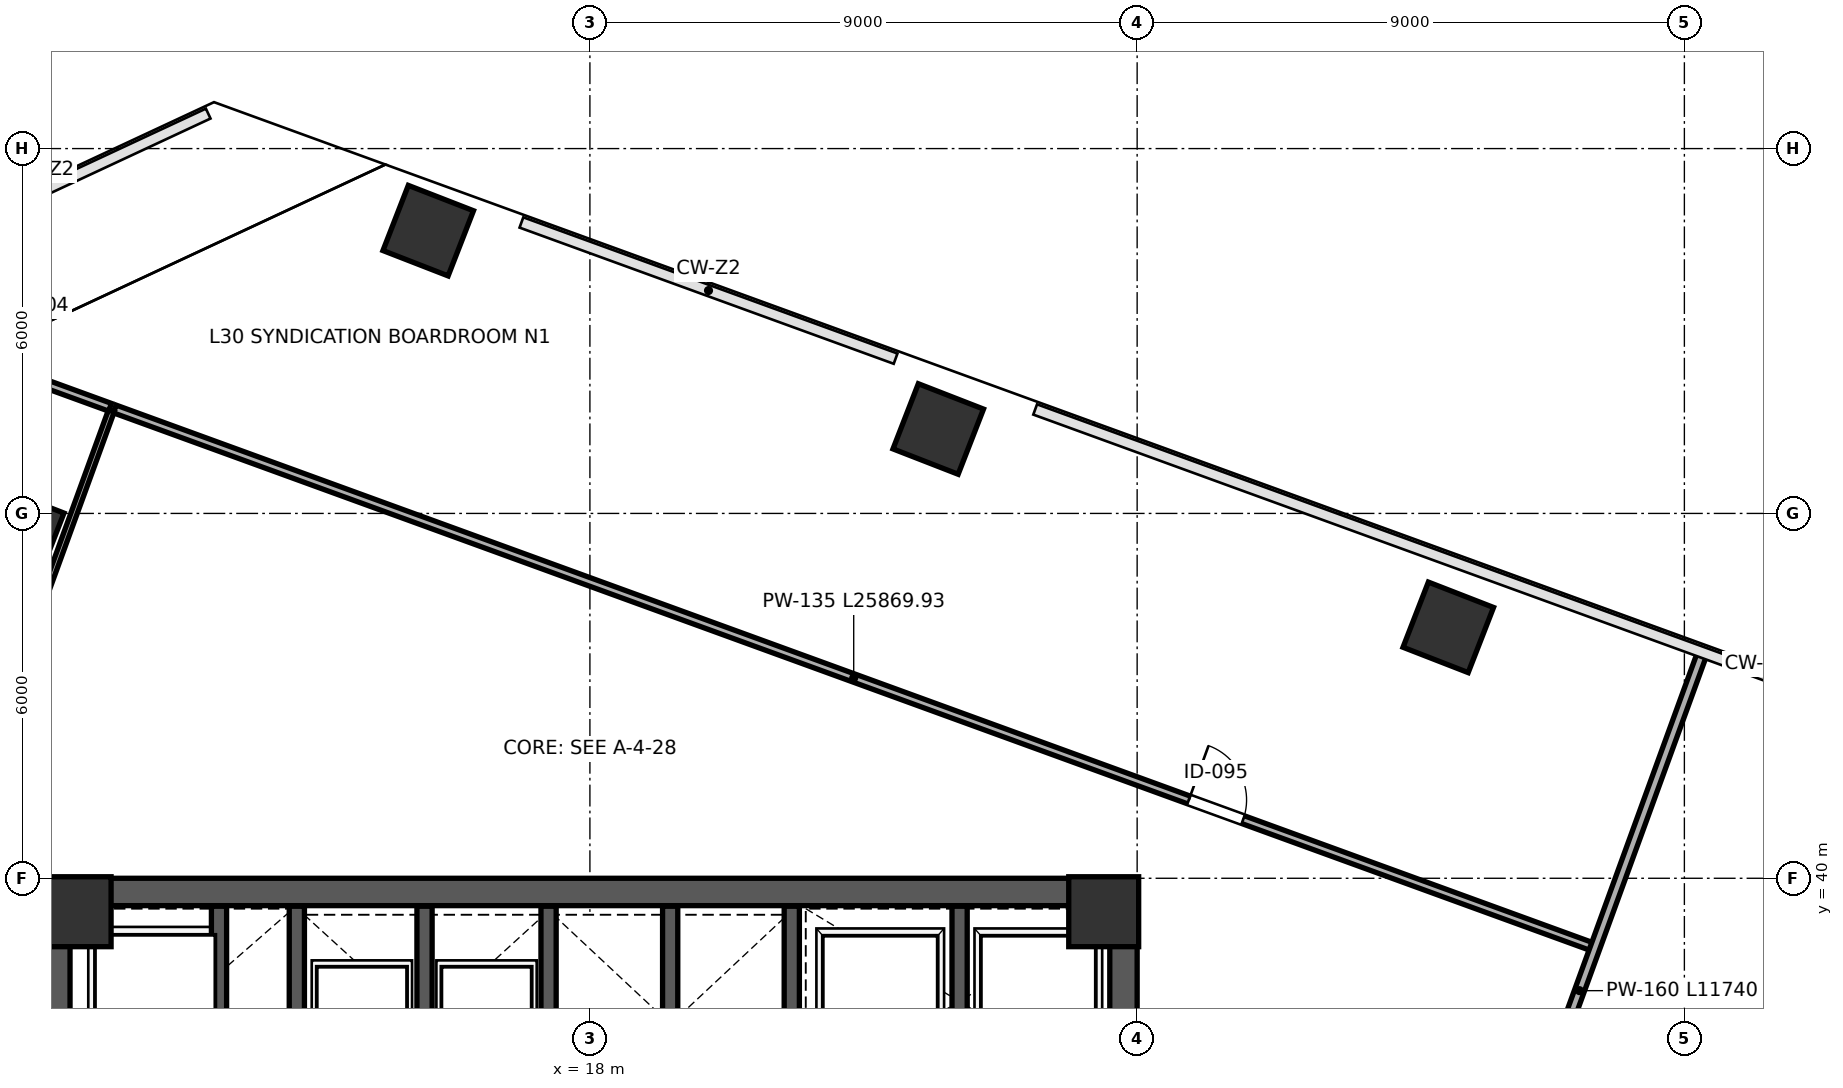
"""IFC4 building model, lengths in metres.
Left out: names, types, materials, properties, quantities, classifications, styles, units other than length and angle.
Written with IfcOpenShell. Run it as: python <this file> out.ifc"""

import sys

from ifc_helpers import new_model, si_unit, direction, frame, frame_2d, origin, origin_2d, place, context, subcontext, project, spatial, rectangle, extrude, clip, halfspace, source, transform, mapped, element, fill, save


model = new_model("IFC4")
c1 = context("Model", 3, precision=1e-05, world=origin(), true_north=direction((0.0, 1.0)))
c2 = subcontext(c1, "Body", "Model", "MODEL_VIEW")
j1 = project(units=[si_unit("LENGTHUNIT", "METRE"), si_unit("PLANEANGLEUNIT", "RADIAN")], contexts=[c1])
p1 = place(None, origin())
s1 = spatial("IfcSite", under=j1, at=p1, CompositionType="ELEMENT")
p2 = place(p1, origin())
s2 = spatial("IfcBuilding", under=s1, at=p2, CompositionType="ELEMENT")
p3 = place(p2, frame((0.0, 0.0, 137.2)))
s3 = spatial("IfcBuildingStorey", under=s2, at=p3, CompositionType="ELEMENT", Elevation=137.2)
m1 = source(origin(), c2, "Body", "SweptSolid", [
    extrude(rectangle(XDim=1.15, YDim=1.15, at=origin_2d()), origin(), (0.0, 0.0, 1.0), 4.198),
])
for number, where, z_axis, x_axis in (
    (1, (9.55, 39.45, 0.001), (0.0, 0.0, 1.0), (1.0, 0.0, 0.0)),
    (2, (26.45, 39.45, 0.001), (0.0, 0.0, 1.0), (1.0, 0.0, 0.0)),
):
    element("IfcColumn", number, at=place(p3, frame(where, z_axis=z_axis, x_axis=x_axis)), inside=s3, PredefinedType="COLUMN", context=c2, shape_type="MappedRepresentation", body=[
        mapped(m1, transform((0.0, 0.0, 0.0), scale=1.0)),
    ])
p4 = place(p3, frame((15.341, 50.65, 0.0), z_axis=(0.096748017345, 0.030765059909, 0.994833318817), x_axis=(-0.061176177051, -0.99744853389, 0.036795347569)))
e3 = element("IfcColumn", 3, at=p4, inside=s3, PredefinedType="COLUMN", context=c2, shape_type="Clipping", body=[
    clip(clip(extrude(rectangle(XDim=1.15, YDim=1.15, at=origin_2d()), origin(), (0.0, 0.0, 1.0), 4.222), halfspace(frame((0.0, 0.0, 0.077), z_axis=(0.0, 0.0, -1.0), x_axis=(1.0, 0.0, 0.0)), False)), halfspace(frame((0.0, 0.0, 4.145), z_axis=(0.0, 0.0, 1.0), x_axis=(1.0, 0.0, 0.0)), False)),
])
p5 = place(p3, frame((23.729, 47.388, 0.0), z_axis=(0.079552556532, -0.012399305971, 0.996753554275), x_axis=(-0.500484286298, -0.865253690413, 0.029180993742)))
e4 = element("IfcColumn", 4, at=p5, inside=s3, PredefinedType="COLUMN", context=c2, shape_type="Clipping", body=[
    clip(clip(extrude(rectangle(XDim=1.15, YDim=1.15, at=origin_2d()), origin(), (0.0, 0.0, 1.0), 4.214), halfspace(frame((0.0, 0.0, 0.061), z_axis=(0.0, 0.0, -1.0), x_axis=(1.0, 0.0, 0.0)), False)), halfspace(frame((0.0, 0.0, 4.153), z_axis=(0.0, 0.0, 1.0), x_axis=(1.0, 0.0, 0.0)), False)),
])
p6 = place(p3, frame((32.117, 44.126, 0.0), z_axis=(0.062155538121, -0.055609801115, 0.996516050599), x_axis=(-0.890608466488, -0.453765183113, 0.030227768921)))
e5 = element("IfcColumn", 5, at=p6, inside=s3, PredefinedType="COLUMN", context=c2, shape_type="Clipping", body=[
    clip(clip(extrude(rectangle(XDim=1.15, YDim=1.15, at=origin_2d()), origin(), (0.0, 0.0, 1.0), 4.215), halfspace(frame((0.0, 0.0, 0.063), z_axis=(0.0, 0.0, -1.0), x_axis=(1.0, 0.0, 0.0)), False)), halfspace(frame((0.0, 0.0, 4.152), z_axis=(0.0, 0.0, 1.0), x_axis=(1.0, 0.0, 0.0)), False)),
])
p7 = place(p3, frame((8.695, 45.563, 0.0), z_axis=(0.070818581829, 0.065495616528, 0.995336652939), x_axis=(0.367965840543, -0.929181806711, 0.034961554169)))
e6 = element("IfcColumn", 6, at=p7, inside=s3, PredefinedType="PILASTER", context=c2, shape_type="Clipping", body=[
    clip(clip(extrude(rectangle(XDim=0.9, YDim=1.3, at=origin_2d()), origin(), (0.0, 0.0, 1.0), 4.22), halfspace(frame((0.0, 0.0, 0.075), z_axis=(0.0, 0.0, -1.0), x_axis=(1.0, 0.0, 0.0)), False)), halfspace(frame((0.0, 0.0, 4.145), z_axis=(0.0, 0.0, 1.0), x_axis=(1.0, 0.0, 0.0)), False)),
])
p8 = place(p3, frame((9.225, 24.45, 0.0), z_axis=(0.0, 0.0, 1.0), x_axis=(0.0, 1.0, 0.0)))
e7 = element("IfcWall", 7, at=p8, inside=s3, PredefinedType="SHEAR", context=c2, shape_type="SweptSolid", body=[
    extrude(rectangle(XDim=15.1, YDim=0.45, at=frame_2d((7.55, 0.0))), origin(), (0.0, 0.0, 1.0), 3.96),
])
p9 = place(p3, frame((26.775, 24.45, 0.0), z_axis=(0.0, 0.0, 1.0), x_axis=(0.0, 1.0, 0.0)))
e8 = element("IfcWall", 8, at=p9, inside=s3, PredefinedType="SHEAR", context=c2, shape_type="SweptSolid", body=[
    extrude(rectangle(XDim=15.1, YDim=0.45, at=frame_2d((7.55, 0.0))), origin(), (0.0, 0.0, 1.0), 3.96),
])
p10 = place(p9, frame((8.6, 0.0, 0.0)))
e9 = element("IfcOpeningElement", 9, at=p10, cuts=e8, PredefinedType="OPENING", context=c2, shape_type="SweptSolid", body=[
    extrude(rectangle(XDim=1.15, YDim=2.2, at=frame_2d((0.575, 1.1))), frame((0.0, 0.235, 0.0), z_axis=(0.0, -1.0, 0.0), x_axis=(1.0, 0.0, 0.0)), (0.0, 0.0, 1.0), 0.47),
])
p11 = place(p3, frame((9.0, 39.775, 0.0), z_axis=(0.0, 0.0, 1.0), x_axis=(1.0, 0.0, 0.0)))
e10 = element("IfcWall", 10, at=p11, inside=s3, PredefinedType="SHEAR", context=c2, shape_type="SweptSolid", body=[
    extrude(rectangle(XDim=18.0, YDim=0.45, at=frame_2d((9.0, 0.0))), origin(), (0.0, 0.0, 1.0), 3.96),
])
p12 = place(p3, frame((21.32, 32.12, 0.0), z_axis=(0.0, 0.0, 1.0), x_axis=(0.0, 1.0, 0.0)))
e11 = element("IfcWall", 11, at=p12, inside=s3, PredefinedType="SHEAR", context=c2, shape_type="SweptSolid", body=[
    extrude(rectangle(XDim=7.42, YDim=0.25, at=frame_2d((3.71, 0.0))), origin(), (0.0, 0.0, 1.0), 3.96),
])
p13 = place(p12, frame((1.4, 0.0, 0.0)))
e12 = element("IfcOpeningElement", 12, at=p13, cuts=e11, PredefinedType="OPENING", context=c2, shape_type="SweptSolid", body=[
    extrude(rectangle(XDim=1.15, YDim=2.2, at=frame_2d((0.575, 1.1))), frame((0.0, 0.135, 0.0), z_axis=(0.0, -1.0, 0.0), x_axis=(1.0, 0.0, 0.0)), (0.0, 0.0, 1.0), 0.27),
])
p14 = place(p3, frame((11.9, 36.31, 0.0), z_axis=(0.0, 0.0, 1.0), x_axis=(0.0, 1.0, 0.0)))
e13 = element("IfcWall", 13, at=p14, inside=s3, PredefinedType="SHEAR", context=c2, shape_type="SweptSolid", body=[
    extrude(rectangle(XDim=3.23, YDim=0.25, at=frame_2d((1.615, 0.0))), origin(), (0.0, 0.0, 1.0), 3.96),
])
p15 = place(p3, frame((24.08, 36.48, 0.0), z_axis=(0.0, 0.0, 1.0), x_axis=(0.0, 1.0, 0.0)))
e14 = element("IfcWall", 14, at=p15, inside=s3, PredefinedType="SHEAR", context=c2, shape_type="SweptSolid", body=[
    extrude(rectangle(XDim=3.06, YDim=0.25, at=frame_2d((1.53, 0.0))), origin(), (0.0, 0.0, 1.0), 3.96),
])
for number, where, z_axis, x_axis in (
    (15, (13.18, 35.81, 0.0), (0.0, 0.0, 1.0), (0.0, 1.0, 0.0)),
    (16, (15.28, 35.81, 0.0), (0.0, 0.0, 1.0), (0.0, 1.0, 0.0)),
    (17, (17.32, 35.81, 0.0), (0.0, 0.0, 1.0), (0.0, 1.0, 0.0)),
    (18, (19.32, 35.81, 0.0), (0.0, 0.0, 1.0), (0.0, 1.0, 0.0)),
):
    element("IfcWall", number, at=place(p3, frame(where, z_axis=z_axis, x_axis=x_axis)), inside=s3, PredefinedType="SHEAR", context=c2, shape_type="SweptSolid", body=[
        extrude(rectangle(XDim=3.73, YDim=0.25, at=frame_2d((1.865, 0.0))), origin(), (0.0, 0.0, 1.0), 3.96),
    ])
p16 = place(p3, frame((10.184, 47.719, 0.0), z_axis=(0.0, 0.0, 1.0), x_axis=(0.939691432235, -0.342023408826, 0.0)))
e19 = element("IfcWall", 19, at=p16, inside=s3, PredefinedType="PARTITIONING", context=c2, shape_type="SweptSolid", body=[
    extrude(rectangle(XDim=25.87, YDim=0.135, at=frame_2d((12.935, 0.0))), origin(), (0.0, 0.0, 1.0), 3.96),
])
p17 = place(p16, frame((18.8, 0.0, 0.0)))
e20 = element("IfcOpeningElement", 20, at=p17, cuts=e19, PredefinedType="OPENING", context=c2, shape_type="SweptSolid", body=[
    extrude(rectangle(XDim=0.95, YDim=2.15, at=frame_2d((0.475, 1.075))), frame((0.0, 0.078, 0.0), z_axis=(0.0, -1.0, 0.0), x_axis=(1.0, 0.0, 0.0)), (0.0, 0.0, 1.0), 0.155),
])
p18 = place(p3, frame((2.362, 26.345, 0.0), z_axis=(0.0, 0.0, 1.0), x_axis=(0.342021727767, 0.939692044095, 0.0)))
e21 = element("IfcWall", 21, at=p18, inside=s3, PredefinedType="PARTITIONING", context=c2, shape_type="SweptSolid", body=[
    extrude(rectangle(XDim=22.72, YDim=0.1, at=frame_2d((11.36, 0.0))), origin(), (0.0, 0.0, 1.0), 3.96),
])
p19 = place(p18, frame((6.2, 0.0, 0.0)))
e22 = element("IfcOpeningElement", 22, at=p19, cuts=e21, PredefinedType="OPENING", context=c2, shape_type="SweptSolid", body=[
    extrude(rectangle(XDim=0.95, YDim=2.15, at=frame_2d((0.475, 1.075))), frame((0.0, 0.06, 0.0), z_axis=(0.0, -1.0, 0.0), x_axis=(1.0, 0.0, 0.0)), (0.0, 0.0, 1.0), 0.12),
])
p20 = place(p3, frame((5.946, 49.261, 0.0), z_axis=(0.0, 0.0, 1.0), x_axis=(0.939693620895, -0.342017395535, 0.0)))
e23 = element("IfcWall", 23, at=p20, inside=s3, PredefinedType="PARTITIONING", context=c2, shape_type="SweptSolid", body=[
    extrude(rectangle(XDim=4.43, YDim=0.135, at=frame_2d((2.215, 0.0))), origin(), (0.0, 0.0, 1.0), 3.96),
])
p21 = place(p3, frame((32.267, 32.636, 0.0), z_axis=(0.0, 0.0, 1.0), x_axis=(0.34200686721, 0.939697452791, 0.0)))
e24 = element("IfcWall", 24, at=p21, inside=s3, PredefinedType="PARTITIONING", context=c2, shape_type="SweptSolid", body=[
    extrude(rectangle(XDim=11.74, YDim=0.16, at=frame_2d((5.87, 0.0))), origin(), (0.0, 0.0, 1.0), 3.195),
])
m2 = source(origin(), c2, "Body", "SweptSolid", [
    extrude(rectangle(XDim=0.95, YDim=2.15, at=frame_2d((0.475, 1.075))), frame((0.0, 0.025, 0.0), z_axis=(0.0, -1.0, 0.0), x_axis=(1.0, 0.0, 0.0)), (0.0, 0.0, 1.0), 0.05),
])
p22 = place(p17, origin())
e25 = element("IfcDoor", 25, at=p22, inside=s3, OperationType="SINGLE_SWING_LEFT", PredefinedType="DOOR", context=c2, shape_type="MappedRepresentation", body=[
    mapped(m2, transform((0.0, 0.0, 0.0), scale=1.0)),
])
fill(e20, e25)
save(model, sys.argv[1])
